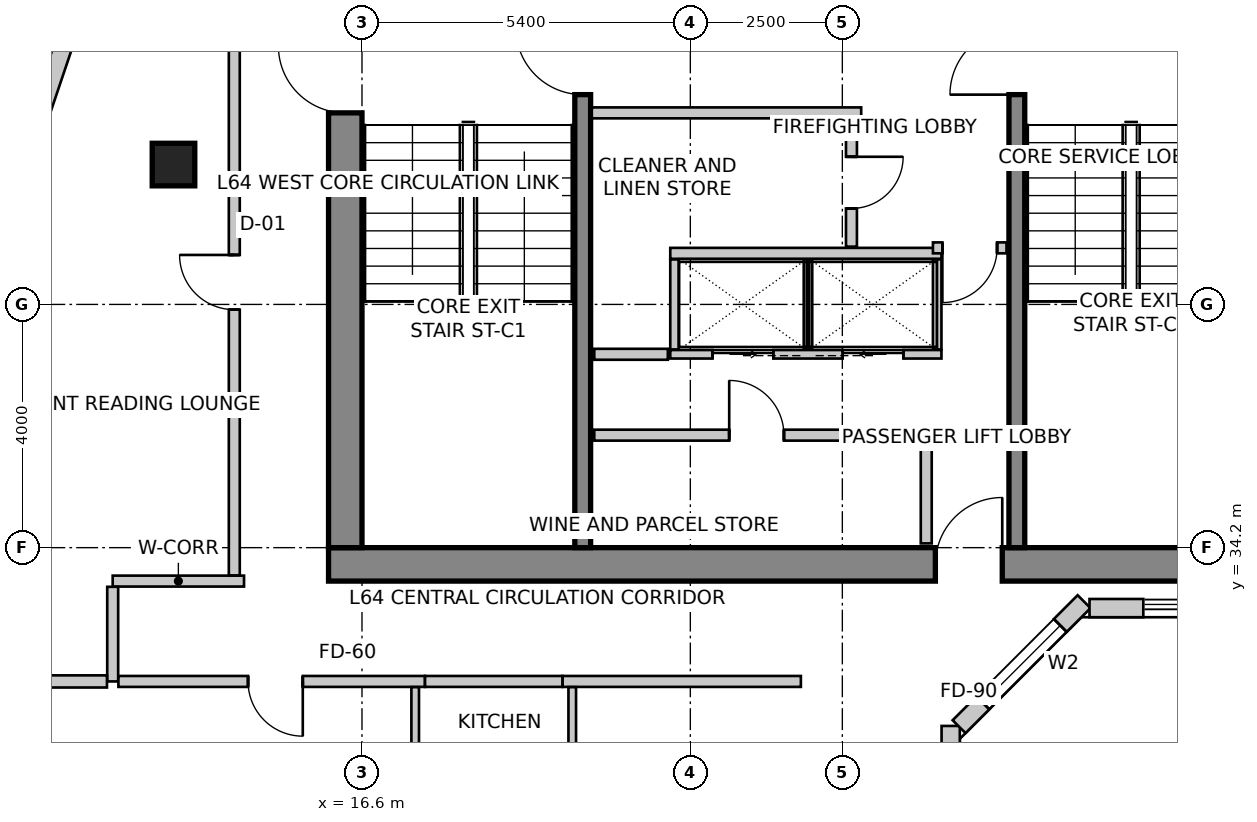
"""IFC4 building model, lengths in metres.
Left out: names, types, materials, properties, quantities, classifications, styles, units other than length and angle.
Written with IfcOpenShell. Run it as: python <this file> out.ifc"""

import sys

from ifc_helpers import new_model, si_unit, direction, frame, frame_2d, origin, origin_2d, place, context, subcontext, project, spatial, rectangle, extrude, source, transform, mapped, element, fill, save


model = new_model("IFC4")
c1 = context("Model", 3, precision=1e-05, world=origin(), true_north=direction((0.0, 1.0)))
c2 = subcontext(c1, "Body", "Model", "MODEL_VIEW")
j1 = project(units=[si_unit("LENGTHUNIT", "METRE"), si_unit("PLANEANGLEUNIT", "RADIAN")], contexts=[c1])
p1 = place(None, origin())
s1 = spatial("IfcSite", under=j1, at=p1, CompositionType="ELEMENT")
p2 = place(p1, origin())
s2 = spatial("IfcBuilding", under=s1, at=p2, CompositionType="ELEMENT")
p3 = place(p2, frame((0.0, 0.0, 252.9)))
s3 = spatial("IfcBuildingStorey", under=s2, at=p3, CompositionType="ELEMENT", Elevation=252.9)
p4 = place(p3, frame((16.05, 33.925, 0.0), z_axis=(0.0, 0.0, 1.0), x_axis=(1.0, 0.0, 0.0)))
e1 = element("IfcWall", 1, at=p4, inside=s3, PredefinedType="SHEAR", context=c2, shape_type="SweptSolid", body=[
    extrude(rectangle(XDim=15.5, YDim=0.55, at=frame_2d((7.75, 0.0))), origin(), (0.0, 0.0, 1.0), 3.6),
])
m1 = source(origin(), c2, "Body", "SweptSolid", [
    extrude(rectangle(XDim=1.1, YDim=2.15, at=frame_2d((0.55, 1.075))), frame((0.0, 0.285, 0.0), z_axis=(0.0, -1.0, 0.0), x_axis=(1.0, 0.0, 0.0)), (0.0, 0.0, 1.0), 0.57),
])
p5 = place(p4, frame((9.98, 0.0, 0.0)))
e2 = element("IfcOpeningElement", 2, at=p5, cuts=e1, PredefinedType="OPENING", context=c2, shape_type="MappedRepresentation", body=[
    mapped(m1, transform((0.0, 0.0, 0.0), scale=1.0)),
])
p6 = place(p3, frame((16.325, 34.2, 0.0), z_axis=(0.0, 0.0, 1.0), x_axis=(0.0, 1.0, 0.0)))
e3 = element("IfcWall", 3, at=p6, inside=s3, PredefinedType="SHEAR", context=c2, shape_type="SweptSolid", body=[
    extrude(rectangle(XDim=11.4, YDim=0.55, at=frame_2d((5.7, 0.0))), origin(), (0.0, 0.0, 1.0), 3.6),
])
p7 = place(p6, frame((7.15, 0.0, 0.0)))
e4 = element("IfcOpeningElement", 4, at=p7, cuts=e3, PredefinedType="OPENING", context=c2, shape_type="MappedRepresentation", body=[
    mapped(m1, transform((0.0, 0.0, 0.0), scale=1.0)),
])
p8 = place(p3, frame((20.23, 34.2, 0.0), z_axis=(0.0, 0.0, 1.0), x_axis=(0.0, 1.0, 0.0)))
e5 = element("IfcWall", 5, at=p8, inside=s3, PredefinedType="SHEAR", context=c2, shape_type="SweptSolid", body=[
    extrude(rectangle(XDim=9.06, YDim=0.26, at=frame_2d((4.53, 0.0))), origin(), (0.0, 0.0, 1.0), 3.6),
])
m2 = source(origin(), c2, "Body", "SweptSolid", [
    extrude(rectangle(XDim=1.1, YDim=2.15, at=frame_2d((0.55, 1.075))), frame((0.0, 0.14, 0.0), z_axis=(0.0, -1.0, 0.0), x_axis=(1.0, 0.0, 0.0)), (0.0, 0.0, 1.0), 0.28),
])
p9 = place(p8, frame((7.45, 0.0, 0.0)))
e6 = element("IfcOpeningElement", 6, at=p9, cuts=e5, PredefinedType="OPENING", context=c2, shape_type="MappedRepresentation", body=[
    mapped(m2, transform((0.0, 0.0, 0.0), scale=1.0)),
])
p10 = place(p3, frame((27.37, 34.2, 0.0), z_axis=(0.0, 0.0, 1.0), x_axis=(0.0, 1.0, 0.0)))
e7 = element("IfcWall", 7, at=p10, inside=s3, PredefinedType="SHEAR", context=c2, shape_type="SweptSolid", body=[
    extrude(rectangle(XDim=9.06, YDim=0.26, at=frame_2d((4.53, 0.0))), origin(), (0.0, 0.0, 1.0), 3.6),
])
p11 = place(p10, frame((7.45, 0.0, 0.0)))
e8 = element("IfcOpeningElement", 8, at=p11, cuts=e7, PredefinedType="OPENING", context=c2, shape_type="MappedRepresentation", body=[
    mapped(m2, transform((0.0, 0.0, 0.0), scale=1.0)),
])
m3 = source(origin(), c2, "Body", "SweptSolid", [
    extrude(rectangle(XDim=0.7, YDim=0.7, at=origin_2d()), origin(), (0.0, 0.0, 1.0), 3.6),
])
p12 = place(p3, frame((13.5, 40.5, 0.0), z_axis=(0.0, 0.0, 1.0), x_axis=(1.0, 0.0, 0.0)))
e9 = element("IfcColumn", 9, at=p12, inside=s3, PredefinedType="COLUMN", context=c2, shape_type="MappedRepresentation", body=[
    mapped(m3, transform((0.0, 0.0, 0.0), scale=1.0)),
])
p13 = place(p3, frame((26.282, 21.557, 0.0), z_axis=(0.0, 0.0, 1.0), x_axis=(0.0, 1.0, 0.0)))
e10 = element("IfcWall", 10, at=p13, inside=s3, PredefinedType="SOLIDWALL", context=c2, shape_type="SweptSolid", body=[
    extrude(rectangle(XDim=9.711, YDim=0.3, at=frame_2d((4.855, 0.0))), origin(), (0.0, 0.0, 1.0), 3.35),
])
m4 = source(origin(), c2, "Body", "SweptSolid", [
    extrude(rectangle(XDim=2.4, YDim=2.2, at=frame_2d((1.2, 1.1))), frame((0.0, 0.16, 0.0), z_axis=(0.0, -1.0, 0.0), x_axis=(1.0, 0.0, 0.0)), (0.0, 0.0, 1.0), 0.32),
])
p14 = place(p13, frame((1.388, 0.0, 0.85)))
e11 = element("IfcOpeningElement", 11, at=p14, cuts=e10, PredefinedType="OPENING", context=c2, shape_type="MappedRepresentation", body=[
    mapped(m4, transform((0.0, 0.0, 0.0), scale=1.0)),
])
m5 = source(origin(), c2, "Body", "SweptSolid", [
    extrude(rectangle(XDim=2.1, YDim=2.0, at=frame_2d((1.05, 1.0))), frame((0.0, 0.16, 0.0), z_axis=(0.0, -1.0, 0.0), x_axis=(1.0, 0.0, 0.0)), (0.0, 0.0, 1.0), 0.32),
])
p15 = place(p13, frame((6.073, 0.0, 0.85)))
e12 = element("IfcOpeningElement", 12, at=p15, cuts=e10, PredefinedType="OPENING", context=c2, shape_type="MappedRepresentation", body=[
    mapped(m5, transform((0.0, 0.0, 0.0), scale=1.0)),
])
p16 = place(p3, frame((26.42, 31.256, 0.0), z_axis=(0.0, 0.0, 1.0), x_axis=(0.707106781187, 0.707106781187, 0.0)))
e13 = element("IfcWall", 13, at=p16, inside=s3, PredefinedType="SOLIDWALL", context=c2, shape_type="SweptSolid", body=[
    extrude(rectangle(XDim=2.907, YDim=0.3, at=frame_2d((1.454, 0.0))), origin(), (0.0, 0.0, 1.0), 3.35),
])
m6 = source(origin(), c2, "Body", "SweptSolid", [
    extrude(rectangle(XDim=1.8, YDim=2.1, at=frame_2d((0.9, 1.05))), frame((0.0, 0.16, 0.0), z_axis=(0.0, -1.0, 0.0), x_axis=(1.0, 0.0, 0.0)), (0.0, 0.0, 1.0), 0.32),
])
p17 = place(p16, frame((0.554, 0.0, 0.85)))
e14 = element("IfcOpeningElement", 14, at=p17, cuts=e13, PredefinedType="OPENING", context=c2, shape_type="MappedRepresentation", body=[
    mapped(m6, transform((0.0, 0.0, 0.0), scale=1.0)),
])
p18 = place(p3, frame((28.565, 33.206, 0.0), z_axis=(0.0, 0.0, 1.0), x_axis=(1.0, 0.0, 0.0)))
e15 = element("IfcWall", 15, at=p18, inside=s3, PredefinedType="SOLIDWALL", context=c2, shape_type="SweptSolid", body=[
    extrude(rectangle(XDim=0.885, YDim=0.3, at=frame_2d((0.442, 0.0))), origin(), (0.0, 0.0, 1.0), 3.35),
])
p19 = place(p3, frame((13.269, 47.134, 0.0), z_axis=(0.0, 0.0, 1.0), x_axis=(-0.3199211297, -0.947444178182, 0.0)))
e16 = element("IfcWall", 16, at=p19, inside=s3, PredefinedType="SOLIDWALL", context=c2, shape_type="SweptSolid", body=[
    extrude(rectangle(XDim=16.132, YDim=0.3, at=frame_2d((8.066, 0.0))), origin(), (0.0, 0.0, 1.0), 3.35),
])
p20 = place(p19, frame((2.435, 0.0, 0.85)))
e17 = element("IfcOpeningElement", 17, at=p20, cuts=e16, PredefinedType="OPENING", context=c2, shape_type="MappedRepresentation", body=[
    mapped(m4, transform((0.0, 0.0, 0.0), scale=1.0)),
])
p21 = place(p19, frame((7.417, 0.0, 0.85)))
e18 = element("IfcOpeningElement", 18, at=p21, cuts=e16, PredefinedType="OPENING", context=c2, shape_type="MappedRepresentation", body=[
    mapped(m5, transform((0.0, 0.0, 0.0), scale=1.0)),
])
p22 = place(p19, frame((12.099, 0.0, 0.85)))
e19 = element("IfcOpeningElement", 19, at=p22, cuts=e16, PredefinedType="OPENING", context=c2, shape_type="MappedRepresentation", body=[
    mapped(m4, transform((0.0, 0.0, 0.0), scale=1.0)),
])
p23 = place(p3, frame((21.67, 37.38, 0.0), z_axis=(0.0, 0.0, 1.0), x_axis=(1.0, 0.0, 0.0)))
e20 = element("IfcWall", 20, at=p23, inside=s3, PredefinedType="SOLIDWALL", context=c2, shape_type="SweptSolid", body=[
    extrude(rectangle(XDim=4.46, YDim=0.14, at=frame_2d((2.23, 0.0))), origin(), (0.0, 0.0, 1.0), 3.35),
])
m7 = source(origin(), c2, "Body", "SweptSolid", [
    extrude(rectangle(XDim=1.0, YDim=2.15, at=frame_2d((0.5, 1.075))), frame((0.0, 0.08, 0.0), z_axis=(0.0, -1.0, 0.0), x_axis=(1.0, 0.0, 0.0)), (0.0, 0.0, 1.0), 0.16),
])
p24 = place(p23, frame((0.695, 0.0, 0.0)))
e21 = element("IfcOpeningElement", 21, at=p24, cuts=e20, PredefinedType="OPENING", context=c2, shape_type="MappedRepresentation", body=[
    mapped(m7, transform((0.0, 0.0, 0.0), scale=1.0)),
])
p25 = place(p23, frame((2.835, 0.0, 0.0)))
e22 = element("IfcOpeningElement", 22, at=p25, cuts=e20, PredefinedType="OPENING", context=c2, shape_type="MappedRepresentation", body=[
    mapped(m7, transform((0.0, 0.0, 0.0), scale=1.0)),
])
p26 = place(p3, frame((21.67, 39.04, 0.0), z_axis=(0.0, 0.0, 1.0), x_axis=(1.0, 0.0, 0.0)))
e23 = element("IfcWall", 23, at=p26, inside=s3, PredefinedType="SOLIDWALL", context=c2, shape_type="SweptSolid", body=[
    extrude(rectangle(XDim=4.46, YDim=0.18, at=frame_2d((2.23, 0.0))), origin(), (0.0, 0.0, 1.0), 3.35),
])
for number, where, z_axis, x_axis in (
    (24, (26.06, 37.46, 0.0), (0.0, 0.0, 1.0), (0.0, 1.0, 0.0)),
    (25, (21.74, 37.46, 0.0), (0.0, 0.0, 1.0), (0.0, 1.0, 0.0)),
    (26, (23.935, 37.46, 0.0), (0.0, 0.0, 1.0), (0.0, 1.0, 0.0)),
):
    element("IfcWall", number, at=place(p3, frame(where, z_axis=z_axis, x_axis=x_axis)), inside=s3, PredefinedType="SOLIDWALL", context=c2, shape_type="SweptSolid", body=[
        extrude(rectangle(XDim=1.48, YDim=0.14, at=frame_2d((0.74, 0.0))), origin(), (0.0, 0.0, 1.0), 3.35),
    ])
p27 = place(p3, frame((24.81, 41.35, 0.0), z_axis=(0.0, 0.0, 1.0), x_axis=(-1.0, 0.0, 0.0)))
e27 = element("IfcWall", 27, at=p27, inside=s3, PredefinedType="PARTITIONING", context=c2, shape_type="SweptSolid", body=[
    extrude(rectangle(XDim=4.43, YDim=0.18, at=frame_2d((2.215, 0.0))), origin(), (0.0, 0.0, 1.0), 3.35),
])
p28 = place(p3, frame((24.65, 41.256, 0.0), z_axis=(0.0, 0.0, 1.0), x_axis=(0.0, -1.0, 0.0)))
e28 = element("IfcWall", 28, at=p28, inside=s3, PredefinedType="PARTITIONING", context=c2, shape_type="SweptSolid", body=[
    extrude(rectangle(XDim=2.106, YDim=0.18, at=frame_2d((1.053, 0.0))), origin(), (0.0, 0.0, 1.0), 3.35),
])
m8 = source(origin(), c2, "Body", "SweptSolid", [
    extrude(rectangle(XDim=0.85, YDim=2.15, at=frame_2d((0.425, 1.075))), frame((0.0, 0.1, 0.0), z_axis=(0.0, -1.0, 0.0), x_axis=(1.0, 0.0, 0.0)), (0.0, 0.0, 1.0), 0.2),
])
p29 = place(p28, frame((0.628, 0.0, 0.0)))
e29 = element("IfcOpeningElement", 29, at=p29, cuts=e28, PredefinedType="OPENING", context=c2, shape_type="MappedRepresentation", body=[
    mapped(m8, transform((0.0, 0.0, 0.0), scale=1.0)),
])
p30 = place(p3, frame((21.63, 37.38, 0.0), z_axis=(0.0, 0.0, 1.0), x_axis=(-1.0, 0.0, 0.0)))
e30 = element("IfcWall", 30, at=p30, inside=s3, PredefinedType="PARTITIONING", context=c2, shape_type="SweptSolid", body=[
    extrude(rectangle(XDim=1.21, YDim=0.18, at=frame_2d((0.605, 0.0))), origin(), (0.0, 0.0, 1.0), 3.35),
])
p31 = place(p3, frame((27.2, 39.13, 0.0), z_axis=(0.0, 0.0, 1.0), x_axis=(-1.0, 0.0, 0.0)))
e31 = element("IfcWall", 31, at=p31, inside=s3, PredefinedType="PARTITIONING", context=c2, shape_type="SweptSolid", body=[
    extrude(rectangle(XDim=1.21, YDim=0.18, at=frame_2d((0.605, 0.0))), origin(), (0.0, 0.0, 1.0), 3.35),
])
m9 = source(origin(), c2, "Body", "SweptSolid", [
    extrude(rectangle(XDim=0.9, YDim=2.15, at=frame_2d((0.45, 1.075))), frame((0.0, 0.1, 0.0), z_axis=(0.0, -1.0, 0.0), x_axis=(1.0, 0.0, 0.0)), (0.0, 0.0, 1.0), 0.2),
])
p32 = place(p31, frame((0.155, 0.0, 0.0)))
e32 = element("IfcOpeningElement", 32, at=p32, cuts=e31, PredefinedType="OPENING", context=c2, shape_type="MappedRepresentation", body=[
    mapped(m9, transform((0.0, 0.0, 0.0), scale=1.0)),
])
p33 = place(p3, frame((20.42, 36.05, 0.0), z_axis=(0.0, 0.0, 1.0), x_axis=(1.0, 0.0, 0.0)))
e33 = element("IfcWall", 33, at=p33, inside=s3, PredefinedType="PARTITIONING", context=c2, shape_type="SweptSolid", body=[
    extrude(rectangle(XDim=5.46, YDim=0.18, at=frame_2d((2.73, 0.0))), origin(), (0.0, 0.0, 1.0), 3.35),
])
p34 = place(p33, frame((2.219, 0.0, 0.0)))
e34 = element("IfcOpeningElement", 34, at=p34, cuts=e33, PredefinedType="OPENING", context=c2, shape_type="MappedRepresentation", body=[
    mapped(m9, transform((0.0, 0.0, 0.0), scale=1.0)),
])
p35 = place(p3, frame((25.88, 35.956, 0.0), z_axis=(0.0, 0.0, 1.0), x_axis=(0.0, -1.0, 0.0)))
e35 = element("IfcWall", 35, at=p35, inside=s3, PredefinedType="PARTITIONING", context=c2, shape_type="SweptSolid", body=[
    extrude(rectangle(XDim=1.686, YDim=0.18, at=frame_2d((0.843, 0.0))), origin(), (0.0, 0.0, 1.0), 2.642),
])
p36 = place(p3, frame((12.5, 33.65, 0.0), z_axis=(0.0, 0.0, 1.0), x_axis=(1.0, 0.0, 0.0)))
e36 = element("IfcWall", 36, at=p36, inside=s3, PredefinedType="PARTITIONING", context=c2, shape_type="SweptSolid", body=[
    extrude(rectangle(XDim=2.16, YDim=0.18, at=frame_2d((1.08, 0.0))), origin(), (0.0, 0.0, 1.0), 3.35),
])
p37 = place(p3, frame((12.5, 32.0, 0.0), z_axis=(0.0, 0.0, 1.0), x_axis=(0.0, 1.0, 0.0)))
e37 = element("IfcWall", 37, at=p37, inside=s3, PredefinedType="PARTITIONING", context=c2, shape_type="SweptSolid", body=[
    extrude(rectangle(XDim=1.556, YDim=0.18, at=frame_2d((0.778, 0.0))), origin(), (0.0, 0.0, 1.0), 3.019),
])
p38 = place(p3, frame((23.818, 32.0, 0.0), z_axis=(0.0, 0.0, 1.0), x_axis=(-1.0, 0.0, 0.0)))
e38 = element("IfcWall", 38, at=p38, inside=s3, PredefinedType="PARTITIONING", context=c2, shape_type="SweptSolid", body=[
    extrude(rectangle(XDim=3.92, YDim=0.18, at=frame_2d((1.96, 0.0))), origin(), (0.0, 0.0, 1.0), 3.019),
])
p39 = place(p3, frame((17.635, 32.0, 0.0), z_axis=(0.0, 0.0, 1.0), x_axis=(-1.0, 0.0, 0.0)))
e39 = element("IfcWall", 39, at=p39, inside=s3, PredefinedType="PARTITIONING", context=c2, shape_type="SweptSolid", body=[
    extrude(rectangle(XDim=5.041, YDim=0.18, at=frame_2d((2.521, 0.0))), origin(), (0.0, 0.0, 1.0), 3.019),
])
p40 = place(p39, frame((2.009, 0.0, 0.0)))
e40 = element("IfcOpeningElement", 40, at=p40, cuts=e39, PredefinedType="OPENING", context=c2, shape_type="MappedRepresentation", body=[
    mapped(m9, transform((0.0, 0.0, 0.0), scale=1.0)),
])
p41 = place(p3, frame((19.896, 32.0, 0.0), z_axis=(0.0, 0.0, 1.0), x_axis=(-1.0, 0.0, 0.0)))
e41 = element("IfcWall", 41, at=p41, inside=s3, PredefinedType="PARTITIONING", context=c2, shape_type="SweptSolid", body=[
    extrude(rectangle(XDim=2.259, YDim=0.18, at=frame_2d((1.129, 0.0))), origin(), (0.0, 0.0, 1.0), 3.35),
])
p42 = place(p3, frame((14.5, 33.744, 0.0), z_axis=(0.0, 0.0, 1.0), x_axis=(0.0, 1.0, 0.0)))
e42 = element("IfcWall", 42, at=p42, inside=s3, PredefinedType="PARTITIONING", context=c2, shape_type="SweptSolid", body=[
    extrude(rectangle(XDim=12.406, YDim=0.18, at=frame_2d((6.203, 0.0))), origin(), (0.0, 0.0, 1.0), 3.35),
])
p43 = place(p42, frame((4.37, 0.0, 0.0)))
e43 = element("IfcOpeningElement", 43, at=p43, cuts=e42, PredefinedType="OPENING", context=c2, shape_type="MappedRepresentation", body=[
    mapped(m9, transform((0.0, 0.0, 0.0), scale=1.0)),
])
p44 = place(p3, frame((12.406, 32.0, 0.0), z_axis=(0.0, 0.0, 1.0), x_axis=(-1.0, 0.0, 0.0)))
e44 = element("IfcWall", 44, at=p44, inside=s3, PredefinedType="PARTITIONING", context=c2, shape_type="SweptSolid", body=[
    extrude(rectangle(XDim=4.126, YDim=0.2, at=frame_2d((2.063, 0.0))), origin(), (0.0, 0.0, 1.0), 2.642),
])
p45 = place(p3, frame((20.058, 25.032, 0.0), z_axis=(0.0, 0.0, 1.0), x_axis=(0.0, 1.0, 0.0)))
e45 = element("IfcWall", 45, at=p45, inside=s3, PredefinedType="PARTITIONING", context=c2, shape_type="SweptSolid", body=[
    extrude(rectangle(XDim=6.874, YDim=0.125, at=frame_2d((3.437, 0.0))), origin(), (0.0, 0.0, 1.0), 2.879),
])
m10 = source(origin(), c2, "Body", "SweptSolid", [
    extrude(rectangle(XDim=0.9, YDim=2.15, at=frame_2d((0.45, 1.075))), frame((0.0, 0.073, 0.0), z_axis=(0.0, -1.0, 0.0), x_axis=(1.0, 0.0, 0.0)), (0.0, 0.0, 1.0), 0.145),
])
p46 = place(p45, frame((2.927, 0.0, 0.0)))
e46 = element("IfcOpeningElement", 46, at=p46, cuts=e45, PredefinedType="OPENING", context=c2, shape_type="MappedRepresentation", body=[
    mapped(m10, transform((0.0, 0.0, 0.0), scale=1.0)),
])
p47 = place(p3, frame((17.475, 31.906, 0.0), z_axis=(0.0, 0.0, 1.0), x_axis=(0.0, -1.0, 0.0)))
e47 = element("IfcWall", 47, at=p47, inside=s3, PredefinedType="PARTITIONING", context=c2, shape_type="SweptSolid", body=[
    extrude(rectangle(XDim=6.874, YDim=0.125, at=frame_2d((3.437, 0.0))), origin(), (0.0, 0.0, 1.0), 2.879),
])
m11 = source(origin(), c2, "Body", "SweptSolid", [
    extrude(rectangle(XDim=0.85, YDim=2.15, at=frame_2d((0.425, 1.075))), frame((0.0, 0.073, 0.0), z_axis=(0.0, -1.0, 0.0), x_axis=(1.0, 0.0, 0.0)), (0.0, 0.0, 1.0), 0.145),
])
p48 = place(p47, frame((3.073, 0.0, 0.0)))
e48 = element("IfcOpeningElement", 48, at=p48, cuts=e47, PredefinedType="OPENING", context=c2, shape_type="MappedRepresentation", body=[
    mapped(m11, transform((0.0, 0.0, 0.0), scale=1.0)),
])
m12 = source(origin(), c2, "Body", "SweptSolid", [
    extrude(rectangle(XDim=1.8, YDim=2.1, at=frame_2d((0.9, 1.05))), frame((0.0, -0.015, 0.0), z_axis=(0.0, -1.0, 0.0), x_axis=(1.0, 0.0, 0.0)), (0.0, 0.0, 1.0), 0.06),
])
p49 = place(p17, origin())
e49 = element("IfcWindow", 49, at=p49, inside=s3, PartitioningType="SINGLE_PANEL", PredefinedType="WINDOW", context=c2, shape_type="MappedRepresentation", body=[
    mapped(m12, transform((0.0, 0.0, 0.0), scale=1.0)),
])
fill(e14, e49)
m13 = source(origin(), c2, "Body", "SweptSolid", [
    extrude(rectangle(XDim=1.0, YDim=2.15, at=frame_2d((0.5, 1.075))), frame((0.0, 0.025, 0.0), z_axis=(0.0, -1.0, 0.0), x_axis=(1.0, 0.0, 0.0)), (0.0, 0.0, 1.0), 0.05),
])
p50 = place(p24, origin())
e50 = element("IfcDoor", 50, at=p50, inside=s3, OperationType="SLIDING_TO_RIGHT", PredefinedType="DOOR", context=c2, shape_type="MappedRepresentation", body=[
    mapped(m13, transform((0.0, 0.0, 0.0), scale=1.0)),
])
fill(e21, e50)
p51 = place(p25, origin())
e51 = element("IfcDoor", 51, at=p51, inside=s3, OperationType="SLIDING_TO_LEFT", PredefinedType="DOOR", context=c2, shape_type="MappedRepresentation", body=[
    mapped(m13, transform((0.0, 0.0, 0.0), scale=1.0)),
])
fill(e22, e51)
m14 = source(origin(), c2, "Body", "SweptSolid", [
    extrude(rectangle(XDim=1.1, YDim=2.15, at=frame_2d((0.55, 1.075))), frame((0.0, 0.025, 0.0), z_axis=(0.0, -1.0, 0.0), x_axis=(1.0, 0.0, 0.0)), (0.0, 0.0, 1.0), 0.05),
])
p52 = place(p9, origin())
e52 = element("IfcDoor", 52, at=p52, inside=s3, OperationType="SINGLE_SWING_RIGHT", PredefinedType="DOOR", context=c2, shape_type="MappedRepresentation", body=[
    mapped(m14, transform((0.0, 0.0, 0.0), scale=1.0)),
])
fill(e6, e52)
p53 = place(p11, origin())
e53 = element("IfcDoor", 53, at=p53, inside=s3, OperationType="SINGLE_SWING_LEFT", PredefinedType="DOOR", context=c2, shape_type="MappedRepresentation", body=[
    mapped(m14, transform((0.0, 0.0, 0.0), scale=1.0)),
])
fill(e8, e53)
p54 = place(p7, origin())
e54 = element("IfcDoor", 54, at=p54, inside=s3, OperationType="SINGLE_SWING_RIGHT", PredefinedType="DOOR", context=c2, shape_type="MappedRepresentation", body=[
    mapped(m14, transform((0.0, 0.0, 0.0), scale=1.0)),
])
fill(e4, e54)
p55 = place(p5, origin())
e55 = element("IfcDoor", 55, at=p55, inside=s3, OperationType="SINGLE_SWING_RIGHT", PredefinedType="DOOR", context=c2, shape_type="MappedRepresentation", body=[
    mapped(m14, transform((0.0, 0.0, 0.0), scale=1.0)),
])
fill(e2, e55)
m15 = source(origin(), c2, "Body", "SweptSolid", [
    extrude(rectangle(XDim=0.85, YDim=2.15, at=frame_2d((0.425, 1.075))), frame((0.0, 0.025, 0.0), z_axis=(0.0, -1.0, 0.0), x_axis=(1.0, 0.0, 0.0)), (0.0, 0.0, 1.0), 0.05),
])
p56 = place(p29, origin())
e56 = element("IfcDoor", 56, at=p56, inside=s3, OperationType="SINGLE_SWING_LEFT", PredefinedType="DOOR", context=c2, shape_type="MappedRepresentation", body=[
    mapped(m15, transform((0.0, 0.0, 0.0), scale=1.0)),
])
fill(e29, e56)
m16 = source(origin(), c2, "Body", "SweptSolid", [
    extrude(rectangle(XDim=0.9, YDim=2.15, at=frame_2d((0.45, 1.075))), frame((0.0, 0.025, 0.0), z_axis=(0.0, -1.0, 0.0), x_axis=(1.0, 0.0, 0.0)), (0.0, 0.0, 1.0), 0.05),
])
p57 = place(p32, origin())
e57 = element("IfcDoor", 57, at=p57, inside=s3, OperationType="SINGLE_SWING_RIGHT", PredefinedType="DOOR", context=c2, shape_type="MappedRepresentation", body=[
    mapped(m16, transform((0.0, 0.0, 0.0), scale=1.0)),
])
fill(e32, e57)
p58 = place(p34, origin())
e58 = element("IfcDoor", 58, at=p58, inside=s3, OperationType="SINGLE_SWING_LEFT", PredefinedType="DOOR", context=c2, shape_type="MappedRepresentation", body=[
    mapped(m16, transform((0.0, 0.0, 0.0), scale=1.0)),
])
fill(e34, e58)
m17 = source(origin(), c2, "Body", "SweptSolid", [
    extrude(rectangle(XDim=0.9, YDim=2.15, at=frame_2d((0.45, 1.075))), frame((0.0, 0.025, 0.0), z_axis=(0.0, -1.0, 0.0), x_axis=(1.0, 0.0, 0.0)), (0.0, 0.0, 1.0), 0.05),
])
p59 = place(p43, origin())
e59 = element("IfcDoor", 59, at=p59, inside=s3, OperationType="SINGLE_SWING_RIGHT", PredefinedType="DOOR", context=c2, shape_type="MappedRepresentation", body=[
    mapped(m17, transform((0.0, 0.0, 0.0), scale=1.0)),
])
fill(e43, e59)
p60 = place(p40, origin())
e60 = element("IfcDoor", 60, at=p60, inside=s3, OperationType="SINGLE_SWING_LEFT", PredefinedType="DOOR", context=c2, shape_type="MappedRepresentation", body=[
    mapped(m16, transform((0.0, 0.0, 0.0), scale=1.0)),
])
fill(e40, e60)
save(model, sys.argv[1])
